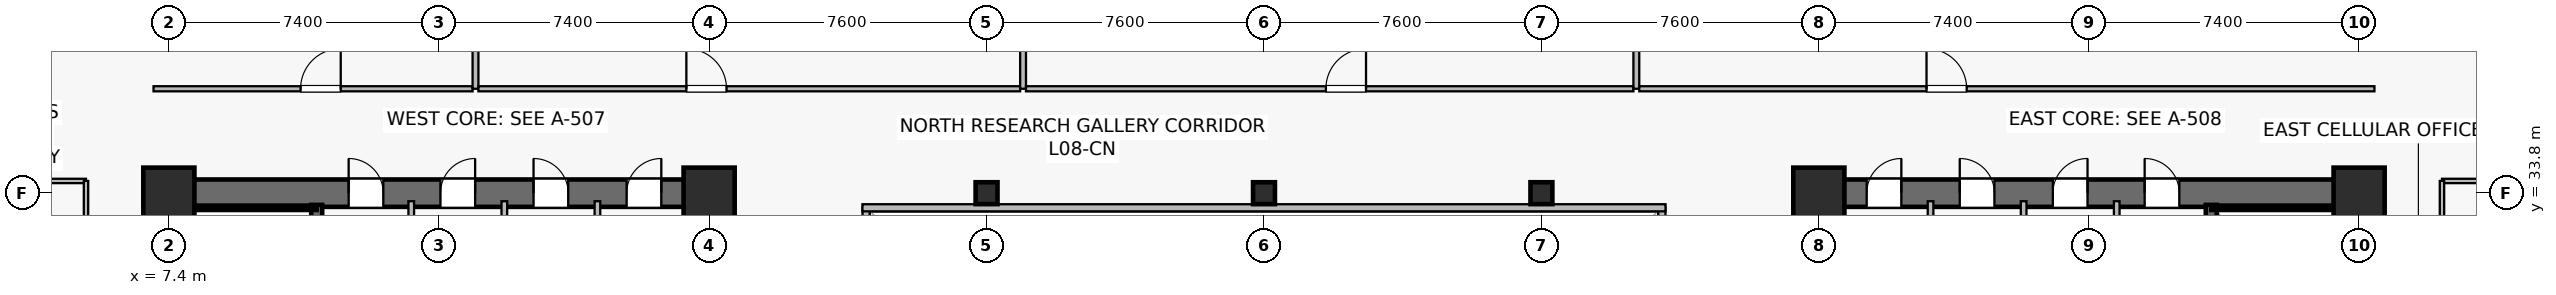
"""IFC4 building model, lengths in metres.
Left out: names, types, materials, properties, quantities, classifications, styles, units other than length and angle.
Written with IfcOpenShell. Run it as: python <this file> out.ifc"""

import sys

from ifc_helpers import new_model, si_unit, direction, frame, frame_2d, origin, origin_2d, place, context, subcontext, project, spatial, rectangle, hollow_rectangle, extrude, source, transform, mapped, element, fill, save


model = new_model("IFC4")
c1 = context("Model", 3, precision=1e-05, world=origin(), true_north=direction((0.0, 1.0)))
c2 = subcontext(c1, "Body", "Model", "MODEL_VIEW")
j1 = project(units=[si_unit("LENGTHUNIT", "METRE"), si_unit("PLANEANGLEUNIT", "RADIAN")], contexts=[c1])
p1 = place(None, origin())
s1 = spatial("IfcSite", under=j1, at=p1, CompositionType="ELEMENT")
p2 = place(p1, origin())
s2 = spatial("IfcBuilding", under=s1, at=p2, CompositionType="ELEMENT")
p3 = place(p2, frame((0.0, 0.0, 33.4)))
s3 = spatial("IfcBuildingStorey", under=s2, at=p3, CompositionType="ELEMENT", Elevation=33.4)
p4 = place(p3, frame((7.025, 33.8, 0.0), z_axis=(0.0, 0.0, 1.0), x_axis=(1.0, 0.0, 0.0)))
e1 = element("IfcWall", 1, at=p4, inside=s3, PredefinedType="SHEAR", context=c2, shape_type="SweptSolid", body=[
    extrude(rectangle(XDim=15.55, YDim=0.75, at=frame_2d((7.775, 0.0))), origin(), (0.0, 0.0, 1.0), 3.78),
])
p5 = place(p4, frame((5.3, 0.0, 0.0)))
e2 = element("IfcOpeningElement", 2, at=p5, cuts=e1, PredefinedType="OPENING", context=c2, shape_type="SweptSolid", body=[
    extrude(rectangle(XDim=0.95, YDim=2.15, at=frame_2d((0.475, 1.075))), frame((0.0, 0.385, 0.0), z_axis=(0.0, -1.0, 0.0), x_axis=(1.0, 0.0, 0.0)), (0.0, 0.0, 1.0), 0.77),
])
p6 = place(p4, frame((7.815, 0.0, 0.0)))
e3 = element("IfcOpeningElement", 3, at=p6, cuts=e1, PredefinedType="OPENING", context=c2, shape_type="SweptSolid", body=[
    extrude(rectangle(XDim=0.95, YDim=2.15, at=frame_2d((0.475, 1.075))), frame((0.0, 0.385, 0.0), z_axis=(0.0, -1.0, 0.0), x_axis=(1.0, 0.0, 0.0)), (0.0, 0.0, 1.0), 0.77),
])
p7 = place(p4, frame((10.365, 0.0, 0.0)))
e4 = element("IfcOpeningElement", 4, at=p7, cuts=e1, PredefinedType="OPENING", context=c2, shape_type="SweptSolid", body=[
    extrude(rectangle(XDim=0.95, YDim=2.15, at=frame_2d((0.475, 1.075))), frame((0.0, 0.385, 0.0), z_axis=(0.0, -1.0, 0.0), x_axis=(1.0, 0.0, 0.0)), (0.0, 0.0, 1.0), 0.77),
])
p8 = place(p4, frame((12.915, 0.0, 0.0)))
e5 = element("IfcOpeningElement", 5, at=p8, cuts=e1, PredefinedType="OPENING", context=c2, shape_type="SweptSolid", body=[
    extrude(rectangle(XDim=0.95, YDim=2.15, at=frame_2d((0.475, 1.075))), frame((0.0, 0.385, 0.0), z_axis=(0.0, -1.0, 0.0), x_axis=(1.0, 0.0, 0.0)), (0.0, 0.0, 1.0), 0.77),
])
p9 = place(p3, frame((7.4, 15.175, 0.0), z_axis=(0.0, 0.0, 1.0), x_axis=(0.0, 1.0, 0.0)))
e6 = element("IfcWall", 6, at=p9, inside=s3, PredefinedType="SHEAR", context=c2, shape_type="SweptSolid", body=[
    extrude(rectangle(XDim=18.25, YDim=0.75, at=frame_2d((9.125, 0.0))), origin(), (0.0, 0.0, 1.0), 3.78),
])
p10 = place(p3, frame((22.2, 15.175, 0.0), z_axis=(0.0, 0.0, 1.0), x_axis=(0.0, 1.0, 0.0)))
e7 = element("IfcWall", 7, at=p10, inside=s3, PredefinedType="SHEAR", context=c2, shape_type="SweptSolid", body=[
    extrude(rectangle(XDim=18.25, YDim=0.75, at=frame_2d((9.125, 0.0))), origin(), (0.0, 0.0, 1.0), 3.78),
])
p11 = place(p10, frame((3.375, 0.0, 0.0)))
e8 = element("IfcOpeningElement", 8, at=p11, cuts=e7, PredefinedType="OPENING", context=c2, shape_type="SweptSolid", body=[
    extrude(rectangle(XDim=1.42, YDim=2.2, at=frame_2d((0.71, 1.1))), frame((0.0, 0.385, 0.0), z_axis=(0.0, -1.0, 0.0), x_axis=(1.0, 0.0, 0.0)), (0.0, 0.0, 1.0), 0.77),
])
p12 = place(p3, frame((11.45, 24.85, 0.0), z_axis=(0.0, 0.0, 1.0), x_axis=(0.0, 1.0, 0.0)))
e9 = element("IfcWall", 9, at=p12, inside=s3, PredefinedType="SHEAR", context=c2, shape_type="SweptSolid", body=[
    extrude(rectangle(XDim=8.63, YDim=0.3, at=frame_2d((4.315, 0.0))), origin(), (0.0, 0.0, 1.0), 3.78),
])
p13 = place(p12, frame((0.42, 0.0, 0.0)))
e10 = element("IfcOpeningElement", 10, at=p13, cuts=e9, PredefinedType="OPENING", context=c2, shape_type="SweptSolid", body=[
    extrude(rectangle(XDim=1.1, YDim=2.15, at=frame_2d((0.55, 1.075))), frame((0.0, 0.16, 0.0), z_axis=(0.0, -1.0, 0.0), x_axis=(1.0, 0.0, 0.0)), (0.0, 0.0, 1.0), 0.32),
])
p14 = place(p3, frame((7.73, 33.4, 0.0), z_axis=(0.0, 0.0, 1.0), x_axis=(1.0, 0.0, 0.0)))
e11 = element("IfcWall", 11, at=p14, inside=s3, PredefinedType="SOLIDWALL", context=c2, shape_type="SweptSolid", body=[
    extrude(rectangle(XDim=3.72, YDim=0.12, at=frame_2d((1.86, 0.0))), origin(), (0.0, 0.0, 1.0), 3.78),
])
p15 = place(p3, frame((52.225, 33.8, 0.0), z_axis=(0.0, 0.0, 1.0), x_axis=(1.0, 0.0, 0.0)))
e12 = element("IfcWall", 12, at=p15, inside=s3, PredefinedType="SHEAR", context=c2, shape_type="SweptSolid", body=[
    extrude(rectangle(XDim=15.55, YDim=0.75, at=frame_2d((7.775, 0.0))), origin(), (0.0, 0.0, 1.0), 3.78),
])
p16 = place(p15, frame((9.3, 0.0, 0.0)))
e13 = element("IfcOpeningElement", 13, at=p16, cuts=e12, PredefinedType="OPENING", context=c2, shape_type="SweptSolid", body=[
    extrude(rectangle(XDim=0.95, YDim=2.15, at=frame_2d((0.475, 1.075))), frame((0.0, 0.385, 0.0), z_axis=(0.0, -1.0, 0.0), x_axis=(1.0, 0.0, 0.0)), (0.0, 0.0, 1.0), 0.77),
])
p17 = place(p15, frame((6.785, 0.0, 0.0)))
e14 = element("IfcOpeningElement", 14, at=p17, cuts=e12, PredefinedType="OPENING", context=c2, shape_type="SweptSolid", body=[
    extrude(rectangle(XDim=0.95, YDim=2.15, at=frame_2d((0.475, 1.075))), frame((0.0, 0.385, 0.0), z_axis=(0.0, -1.0, 0.0), x_axis=(1.0, 0.0, 0.0)), (0.0, 0.0, 1.0), 0.77),
])
p18 = place(p15, frame((4.235, 0.0, 0.0)))
e15 = element("IfcOpeningElement", 15, at=p18, cuts=e12, PredefinedType="OPENING", context=c2, shape_type="SweptSolid", body=[
    extrude(rectangle(XDim=0.95, YDim=2.15, at=frame_2d((0.475, 1.075))), frame((0.0, 0.385, 0.0), z_axis=(0.0, -1.0, 0.0), x_axis=(1.0, 0.0, 0.0)), (0.0, 0.0, 1.0), 0.77),
])
p19 = place(p15, frame((1.685, 0.0, 0.0)))
e16 = element("IfcOpeningElement", 16, at=p19, cuts=e12, PredefinedType="OPENING", context=c2, shape_type="SweptSolid", body=[
    extrude(rectangle(XDim=0.95, YDim=2.15, at=frame_2d((0.475, 1.075))), frame((0.0, 0.385, 0.0), z_axis=(0.0, -1.0, 0.0), x_axis=(1.0, 0.0, 0.0)), (0.0, 0.0, 1.0), 0.77),
])
p20 = place(p3, frame((52.6, 15.175, 0.0), z_axis=(0.0, 0.0, 1.0), x_axis=(0.0, 1.0, 0.0)))
e17 = element("IfcWall", 17, at=p20, inside=s3, PredefinedType="SHEAR", context=c2, shape_type="SweptSolid", body=[
    extrude(rectangle(XDim=18.25, YDim=0.75, at=frame_2d((9.125, 0.0))), origin(), (0.0, 0.0, 1.0), 3.78),
])
p21 = place(p20, frame((3.375, 0.0, 0.0)))
e18 = element("IfcOpeningElement", 18, at=p21, cuts=e17, PredefinedType="OPENING", context=c2, shape_type="SweptSolid", body=[
    extrude(rectangle(XDim=1.42, YDim=2.2, at=frame_2d((0.71, 1.1))), frame((0.0, 0.385, 0.0), z_axis=(0.0, -1.0, 0.0), x_axis=(1.0, 0.0, 0.0)), (0.0, 0.0, 1.0), 0.77),
])
p22 = place(p3, frame((67.4, 15.175, 0.0), z_axis=(0.0, 0.0, 1.0), x_axis=(0.0, 1.0, 0.0)))
e19 = element("IfcWall", 19, at=p22, inside=s3, PredefinedType="SHEAR", context=c2, shape_type="SweptSolid", body=[
    extrude(rectangle(XDim=18.25, YDim=0.75, at=frame_2d((9.125, 0.0))), origin(), (0.0, 0.0, 1.0), 3.78),
])
p23 = place(p3, frame((63.35, 24.85, 0.0), z_axis=(0.0, 0.0, 1.0), x_axis=(0.0, 1.0, 0.0)))
e20 = element("IfcWall", 20, at=p23, inside=s3, PredefinedType="SHEAR", context=c2, shape_type="SweptSolid", body=[
    extrude(rectangle(XDim=8.63, YDim=0.3, at=frame_2d((4.315, 0.0))), origin(), (0.0, 0.0, 1.0), 3.78),
])
p24 = place(p23, frame((0.42, 0.0, 0.0)))
e21 = element("IfcOpeningElement", 21, at=p24, cuts=e20, PredefinedType="OPENING", context=c2, shape_type="SweptSolid", body=[
    extrude(rectangle(XDim=1.1, YDim=2.15, at=frame_2d((0.55, 1.075))), frame((0.0, 0.16, 0.0), z_axis=(0.0, -1.0, 0.0), x_axis=(1.0, 0.0, 0.0)), (0.0, 0.0, 1.0), 0.32),
])
p25 = place(p3, frame((63.35, 33.4, 0.0), z_axis=(0.0, 0.0, 1.0), x_axis=(1.0, 0.0, 0.0)))
e22 = element("IfcWall", 22, at=p25, inside=s3, PredefinedType="SOLIDWALL", context=c2, shape_type="SweptSolid", body=[
    extrude(rectangle(XDim=3.72, YDim=0.12, at=frame_2d((1.86, 0.0))), origin(), (0.0, 0.0, 1.0), 3.78),
])
m1 = source(origin(), c2, "Body", "SweptSolid", [
    extrude(rectangle(XDim=1.4, YDim=1.4, at=origin_2d()), origin(), (0.0, 0.0, 1.0), 4.1),
])
for number, where, z_axis, x_axis in (
    (23, (7.4, 33.8, 0.0), (0.0, 0.0, 1.0), (1.0, 0.0, 0.0)),
    (24, (22.2, 33.8, 0.0), (0.0, 0.0, 1.0), (1.0, 0.0, 0.0)),
    (25, (52.6, 33.8, 0.0), (0.0, 0.0, 1.0), (1.0, 0.0, 0.0)),
    (26, (67.4, 33.8, 0.0), (0.0, 0.0, 1.0), (1.0, 0.0, 0.0)),
):
    element("IfcColumn", number, at=place(p3, frame(where, z_axis=z_axis, x_axis=x_axis)), inside=s3, PredefinedType="COLUMN", context=c2, shape_type="MappedRepresentation", body=[
        mapped(m1, transform((0.0, 0.0, 0.0), scale=1.0)),
    ])
m2 = source(origin(), c2, "Body", "SweptSolid", [
    extrude(hollow_rectangle(XDim=0.6, YDim=0.6, WallThickness=0.028, at=origin_2d()), origin(), (0.0, 0.0, 1.0), 4.1),
])
for number, where, z_axis, x_axis in (
    (27, (29.8, 33.8, 0.0), (0.0, 0.0, 1.0), (1.0, 0.0, 0.0)),
    (28, (37.4, 33.8, 0.0), (0.0, 0.0, 1.0), (1.0, 0.0, 0.0)),
    (29, (45.0, 33.8, 0.0), (0.0, 0.0, 1.0), (1.0, 0.0, 0.0)),
):
    element("IfcColumn", number, at=place(p3, frame(where, z_axis=z_axis, x_axis=x_axis)), inside=s3, PredefinedType="COLUMN", context=c2, shape_type="MappedRepresentation", body=[
        mapped(m2, transform((0.0, 0.0, 0.0), scale=1.0)),
    ])
for number, where, z_axis, x_axis in (
    (30, (14.04, 29.65, 0.0), (0.0, 0.0, 1.0), (0.0, 1.0, 0.0)),
    (31, (16.59, 29.65, 0.0), (0.0, 0.0, 1.0), (0.0, 1.0, 0.0)),
    (32, (19.14, 29.65, 0.0), (0.0, 0.0, 1.0), (0.0, 1.0, 0.0)),
    (33, (60.76, 29.65, 0.0), (0.0, 0.0, 1.0), (0.0, 1.0, 0.0)),
    (34, (58.21, 29.65, 0.0), (0.0, 0.0, 1.0), (0.0, 1.0, 0.0)),
    (35, (55.66, 29.65, 0.0), (0.0, 0.0, 1.0), (0.0, 1.0, 0.0)),
):
    element("IfcWall", number, at=place(p3, frame(where, z_axis=z_axis, x_axis=x_axis)), inside=s3, PredefinedType="PLUMBINGWALL", context=c2, shape_type="SweptSolid", body=[
        extrude(rectangle(XDim=3.93, YDim=0.155, at=frame_2d((1.965, 0.0))), origin(), (0.0, 0.0, 1.0), 3.78),
    ])
p26 = place(p3, frame((26.5, 15.2, 0.0), z_axis=(0.0, 0.0, 1.0), x_axis=(0.0, 1.0, 0.0)))
e36 = element("IfcWall", 36, at=p26, inside=s3, PredefinedType="SOLIDWALL", context=c2, shape_type="SweptSolid", body=[
    extrude(rectangle(XDim=18.2, YDim=0.195, at=frame_2d((9.1, 0.0))), origin(), (0.0, 0.0, 1.0), 3.78),
])
p27 = place(p26, frame((1.8, 0.0, 0.9)))
e37 = element("IfcOpeningElement", 37, at=p27, cuts=e36, PredefinedType="OPENING", context=c2, shape_type="SweptSolid", body=[
    extrude(rectangle(XDim=1.5, YDim=1.4, at=frame_2d((0.75, 0.7))), frame((0.0, 0.107, 0.0), z_axis=(0.0, -1.0, 0.0), x_axis=(1.0, 0.0, 0.0)), (0.0, 0.0, 1.0), 0.215),
])
p28 = place(p26, frame((13.2, 0.0, 0.9)))
e38 = element("IfcOpeningElement", 38, at=p28, cuts=e36, PredefinedType="OPENING", context=c2, shape_type="SweptSolid", body=[
    extrude(rectangle(XDim=1.5, YDim=1.4, at=frame_2d((0.75, 0.7))), frame((0.0, 0.107, 0.0), z_axis=(0.0, -1.0, 0.0), x_axis=(1.0, 0.0, 0.0)), (0.0, 0.0, 1.0), 0.215),
])
p29 = place(p3, frame((48.3, 15.2, 0.0), z_axis=(0.0, 0.0, 1.0), x_axis=(0.0, 1.0, 0.0)))
e39 = element("IfcWall", 39, at=p29, inside=s3, PredefinedType="SOLIDWALL", context=c2, shape_type="SweptSolid", body=[
    extrude(rectangle(XDim=18.2, YDim=0.195, at=frame_2d((9.1, 0.0))), origin(), (0.0, 0.0, 1.0), 3.78),
])
p30 = place(p29, frame((1.8, 0.0, 0.9)))
e40 = element("IfcOpeningElement", 40, at=p30, cuts=e39, PredefinedType="OPENING", context=c2, shape_type="SweptSolid", body=[
    extrude(rectangle(XDim=1.5, YDim=1.4, at=frame_2d((0.75, 0.7))), frame((0.0, 0.107, 0.0), z_axis=(0.0, -1.0, 0.0), x_axis=(1.0, 0.0, 0.0)), (0.0, 0.0, 1.0), 0.215),
])
p31 = place(p29, frame((13.2, 0.0, 0.9)))
e41 = element("IfcOpeningElement", 41, at=p31, cuts=e39, PredefinedType="OPENING", context=c2, shape_type="SweptSolid", body=[
    extrude(rectangle(XDim=1.5, YDim=1.4, at=frame_2d((0.75, 0.7))), frame((0.0, 0.107, 0.0), z_axis=(0.0, -1.0, 0.0), x_axis=(1.0, 0.0, 0.0)), (0.0, 0.0, 1.0), 0.215),
])
p32 = place(p3, frame((26.4, 33.4, 0.0), z_axis=(0.0, 0.0, 1.0), x_axis=(1.0, 0.0, 0.0)))
e42 = element("IfcWall", 42, at=p32, inside=s3, PredefinedType="SOLIDWALL", context=c2, shape_type="SweptSolid", body=[
    extrude(rectangle(XDim=22.0, YDim=0.195, at=frame_2d((11.0, 0.0))), origin(), (0.0, 0.0, 1.0), 3.78),
])
p33 = place(p3, frame((6.98, 36.66, 0.0), z_axis=(0.0, 0.0, 1.0), x_axis=(1.0, 0.0, 0.0)))
e43 = element("IfcWall", 43, at=p33, inside=s3, PredefinedType="PARTITIONING", context=c2, shape_type="SweptSolid", body=[
    extrude(rectangle(XDim=8.74, YDim=0.14, at=frame_2d((4.37, 0.0))), origin(), (0.0, 0.0, 1.0), 3.065),
])
p34 = place(p33, frame((4.028, 0.0, 0.0)))
e44 = element("IfcOpeningElement", 44, at=p34, cuts=e43, PredefinedType="OPENING", context=c2, shape_type="SweptSolid", body=[
    extrude(rectangle(XDim=1.1, YDim=2.18, at=frame_2d((0.55, 1.09))), frame((0.0, 0.08, 0.0), z_axis=(0.0, -1.0, 0.0), x_axis=(1.0, 0.0, 0.0)), (0.0, 0.0, 1.0), 0.16),
])
p35 = place(p3, frame((15.8, 36.66, 0.0), z_axis=(0.0, 0.0, 1.0), x_axis=(0.0, 1.0, 0.0)))
e45 = element("IfcWall", 45, at=p35, inside=s3, PredefinedType="PARTITIONING", context=c2, shape_type="SweptSolid", body=[
    extrude(rectangle(XDim=11.83, YDim=0.16, at=frame_2d((5.915, 0.0))), origin(), (0.0, 0.0, 1.0), 3.015),
])
p36 = place(p3, frame((15.88, 36.66, 0.0), z_axis=(0.0, 0.0, 1.0), x_axis=(1.0, 0.0, 0.0)))
e46 = element("IfcWall", 46, at=p36, inside=s3, PredefinedType="PARTITIONING", context=c2, shape_type="SweptSolid", body=[
    extrude(rectangle(XDim=14.84, YDim=0.14, at=frame_2d((7.42, 0.0))), origin(), (0.0, 0.0, 1.0), 3.065),
])
p37 = place(p36, frame((5.696, 0.0, 0.0)))
e47 = element("IfcOpeningElement", 47, at=p37, cuts=e46, PredefinedType="OPENING", context=c2, shape_type="SweptSolid", body=[
    extrude(rectangle(XDim=1.1, YDim=2.18, at=frame_2d((0.55, 1.09))), frame((0.0, 0.08, 0.0), z_axis=(0.0, -1.0, 0.0), x_axis=(1.0, 0.0, 0.0)), (0.0, 0.0, 1.0), 0.16),
])
p38 = place(p3, frame((30.8, 36.66, 0.0), z_axis=(0.0, 0.0, 1.0), x_axis=(0.0, 1.0, 0.0)))
e48 = element("IfcWall", 48, at=p38, inside=s3, PredefinedType="PARTITIONING", context=c2, shape_type="SweptSolid", body=[
    extrude(rectangle(XDim=10.63, YDim=0.16, at=frame_2d((5.315, 0.0))), origin(), (0.0, 0.0, 1.0), 3.015),
])
p39 = place(p3, frame((30.88, 36.66, 0.0), z_axis=(0.0, 0.0, 1.0), x_axis=(1.0, 0.0, 0.0)))
e49 = element("IfcWall", 49, at=p39, inside=s3, PredefinedType="PARTITIONING", context=c2, shape_type="SweptSolid", body=[
    extrude(rectangle(XDim=16.64, YDim=0.14, at=frame_2d((8.32, 0.0))), origin(), (0.0, 0.0, 1.0), 3.065),
])
p40 = place(p39, frame((8.215, 0.0, 0.0)))
e50 = element("IfcOpeningElement", 50, at=p40, cuts=e49, PredefinedType="OPENING", context=c2, shape_type="SweptSolid", body=[
    extrude(rectangle(XDim=1.1, YDim=2.18, at=frame_2d((0.55, 1.09))), frame((0.0, 0.08, 0.0), z_axis=(0.0, -1.0, 0.0), x_axis=(1.0, 0.0, 0.0)), (0.0, 0.0, 1.0), 0.16),
])
p41 = place(p3, frame((47.6, 36.66, 0.0), z_axis=(0.0, 0.0, 1.0), x_axis=(0.0, 1.0, 0.0)))
e51 = element("IfcWall", 51, at=p41, inside=s3, PredefinedType="PARTITIONING", context=c2, shape_type="SweptSolid", body=[
    extrude(rectangle(XDim=10.63, YDim=0.16, at=frame_2d((5.315, 0.0))), origin(), (0.0, 0.0, 1.0), 3.015),
])
p42 = place(p3, frame((47.68, 36.66, 0.0), z_axis=(0.0, 0.0, 1.0), x_axis=(1.0, 0.0, 0.0)))
e52 = element("IfcWall", 52, at=p42, inside=s3, PredefinedType="PARTITIONING", context=c2, shape_type="SweptSolid", body=[
    extrude(rectangle(XDim=20.14, YDim=0.14, at=frame_2d((10.07, 0.0))), origin(), (0.0, 0.0, 1.0), 3.065),
])
p43 = place(p42, frame((7.869, 0.0, 0.0)))
e53 = element("IfcOpeningElement", 53, at=p43, cuts=e52, PredefinedType="OPENING", context=c2, shape_type="SweptSolid", body=[
    extrude(rectangle(XDim=1.1, YDim=2.18, at=frame_2d((0.55, 1.09))), frame((0.0, 0.08, 0.0), z_axis=(0.0, -1.0, 0.0), x_axis=(1.0, 0.0, 0.0)), (0.0, 0.0, 1.0), 0.16),
])
p44 = place(p3, frame((0.11, 34.135, 0.0), z_axis=(0.0, 0.0, 1.0), x_axis=(1.0, 0.0, 0.0)))
e54 = element("IfcWall", 54, at=p44, inside=s3, PredefinedType="PARTITIONING", context=c2, shape_type="SweptSolid", body=[
    extrude(rectangle(XDim=5.02, YDim=0.12, at=frame_2d((2.51, 0.0))), origin(), (0.0, 0.0, 1.0), 3.78),
])
p45 = place(p3, frame((5.13, 27.66, 0.0), z_axis=(0.0, 0.0, 1.0), x_axis=(0.0, 1.0, 0.0)))
e55 = element("IfcWall", 55, at=p45, inside=s3, PredefinedType="PARTITIONING", context=c2, shape_type="SweptSolid", body=[
    extrude(rectangle(XDim=6.475, YDim=0.12, at=frame_2d((3.238, 0.0))), origin(), (0.0, 0.0, 1.0), 3.78),
])
p46 = place(p45, frame((2.788, 0.0, 0.0)))
e56 = element("IfcOpeningElement", 56, at=p46, cuts=e55, PredefinedType="OPENING", context=c2, shape_type="SweptSolid", body=[
    extrude(rectangle(XDim=0.9, YDim=2.1, at=frame_2d((0.45, 1.05))), frame((0.0, 0.07, 0.0), z_axis=(0.0, -1.0, 0.0), x_axis=(1.0, 0.0, 0.0)), (0.0, 0.0, 1.0), 0.14),
])
p47 = place(p3, frame((69.67, 34.135, 0.0), z_axis=(0.0, 0.0, 1.0), x_axis=(1.0, 0.0, 0.0)))
e57 = element("IfcWall", 57, at=p47, inside=s3, PredefinedType="PARTITIONING", context=c2, shape_type="SweptSolid", body=[
    extrude(rectangle(XDim=5.02, YDim=0.12, at=frame_2d((2.51, 0.0))), origin(), (0.0, 0.0, 1.0), 3.78),
])
p48 = place(p3, frame((69.67, 23.26, 0.0), z_axis=(0.0, 0.0, 1.0), x_axis=(0.0, 1.0, 0.0)))
e58 = element("IfcWall", 58, at=p48, inside=s3, PredefinedType="PARTITIONING", context=c2, shape_type="SweptSolid", body=[
    extrude(rectangle(XDim=10.875, YDim=0.12, at=frame_2d((5.438, 0.0))), origin(), (0.0, 0.0, 1.0), 3.78),
])
p49 = place(p48, frame((4.988, 0.0, 0.0)))
e59 = element("IfcOpeningElement", 59, at=p49, cuts=e58, PredefinedType="OPENING", context=c2, shape_type="SweptSolid", body=[
    extrude(rectangle(XDim=0.9, YDim=2.1, at=frame_2d((0.45, 1.05))), frame((0.0, 0.07, 0.0), z_axis=(0.0, -1.0, 0.0), x_axis=(1.0, 0.0, 0.0)), (0.0, 0.0, 1.0), 0.14),
])
m3 = source(origin(), c2, "Body", "SweptSolid", [
    extrude(rectangle(XDim=0.95, YDim=2.15, at=frame_2d((0.475, 1.075))), frame((0.0, 0.025, 0.0), z_axis=(0.0, -1.0, 0.0), x_axis=(1.0, 0.0, 0.0)), (0.0, 0.0, 1.0), 0.05),
])
p50 = place(p5, origin())
e60 = element("IfcDoor", 60, at=p50, inside=s3, OperationType="SINGLE_SWING_LEFT", PredefinedType="DOOR", context=c2, shape_type="MappedRepresentation", body=[
    mapped(m3, transform((0.0, 0.0, 0.0), scale=1.0)),
])
fill(e2, e60)
p51 = place(p6, origin())
e61 = element("IfcDoor", 61, at=p51, inside=s3, OperationType="SINGLE_SWING_RIGHT", PredefinedType="DOOR", context=c2, shape_type="MappedRepresentation", body=[
    mapped(m3, transform((0.0, 0.0, 0.0), scale=1.0)),
])
fill(e3, e61)
p52 = place(p7, origin())
e62 = element("IfcDoor", 62, at=p52, inside=s3, OperationType="SINGLE_SWING_LEFT", PredefinedType="DOOR", context=c2, shape_type="MappedRepresentation", body=[
    mapped(m3, transform((0.0, 0.0, 0.0), scale=1.0)),
])
fill(e4, e62)
p53 = place(p8, origin())
e63 = element("IfcDoor", 63, at=p53, inside=s3, OperationType="SINGLE_SWING_RIGHT", PredefinedType="DOOR", context=c2, shape_type="MappedRepresentation", body=[
    mapped(m3, transform((0.0, 0.0, 0.0), scale=1.0)),
])
fill(e5, e63)
p54 = place(p16, origin())
e64 = element("IfcDoor", 64, at=p54, inside=s3, OperationType="SINGLE_SWING_LEFT", PredefinedType="DOOR", context=c2, shape_type="MappedRepresentation", body=[
    mapped(m3, transform((0.0, 0.0, 0.0), scale=1.0)),
])
fill(e13, e64)
p55 = place(p17, origin())
e65 = element("IfcDoor", 65, at=p55, inside=s3, OperationType="SINGLE_SWING_RIGHT", PredefinedType="DOOR", context=c2, shape_type="MappedRepresentation", body=[
    mapped(m3, transform((0.0, 0.0, 0.0), scale=1.0)),
])
fill(e14, e65)
p56 = place(p18, origin())
e66 = element("IfcDoor", 66, at=p56, inside=s3, OperationType="SINGLE_SWING_LEFT", PredefinedType="DOOR", context=c2, shape_type="MappedRepresentation", body=[
    mapped(m3, transform((0.0, 0.0, 0.0), scale=1.0)),
])
fill(e15, e66)
p57 = place(p19, origin())
e67 = element("IfcDoor", 67, at=p57, inside=s3, OperationType="SINGLE_SWING_RIGHT", PredefinedType="DOOR", context=c2, shape_type="MappedRepresentation", body=[
    mapped(m3, transform((0.0, 0.0, 0.0), scale=1.0)),
])
fill(e16, e67)
m4 = source(origin(), c2, "Body", "SweptSolid", [
    extrude(rectangle(XDim=1.1, YDim=2.18, at=frame_2d((0.55, 1.09))), frame((0.0, 0.025, 0.0), z_axis=(0.0, -1.0, 0.0), x_axis=(1.0, 0.0, 0.0)), (0.0, 0.0, 1.0), 0.05),
])
p58 = place(p34, origin())
e68 = element("IfcDoor", 68, at=p58, inside=s3, OperationType="SINGLE_SWING_RIGHT", PredefinedType="DOOR", context=c2, shape_type="MappedRepresentation", body=[
    mapped(m4, transform((0.0, 0.0, 0.0), scale=1.0)),
])
fill(e44, e68)
p59 = place(p37, origin())
e69 = element("IfcDoor", 69, at=p59, inside=s3, OperationType="SINGLE_SWING_LEFT", PredefinedType="DOOR", context=c2, shape_type="MappedRepresentation", body=[
    mapped(m4, transform((0.0, 0.0, 0.0), scale=1.0)),
])
fill(e47, e69)
p60 = place(p40, origin())
e70 = element("IfcDoor", 70, at=p60, inside=s3, OperationType="SINGLE_SWING_RIGHT", PredefinedType="DOOR", context=c2, shape_type="MappedRepresentation", body=[
    mapped(m4, transform((0.0, 0.0, 0.0), scale=1.0)),
])
fill(e50, e70)
p61 = place(p43, origin())
e71 = element("IfcDoor", 71, at=p61, inside=s3, OperationType="SINGLE_SWING_LEFT", PredefinedType="DOOR", context=c2, shape_type="MappedRepresentation", body=[
    mapped(m4, transform((0.0, 0.0, 0.0), scale=1.0)),
])
fill(e53, e71)
save(model, sys.argv[1])
